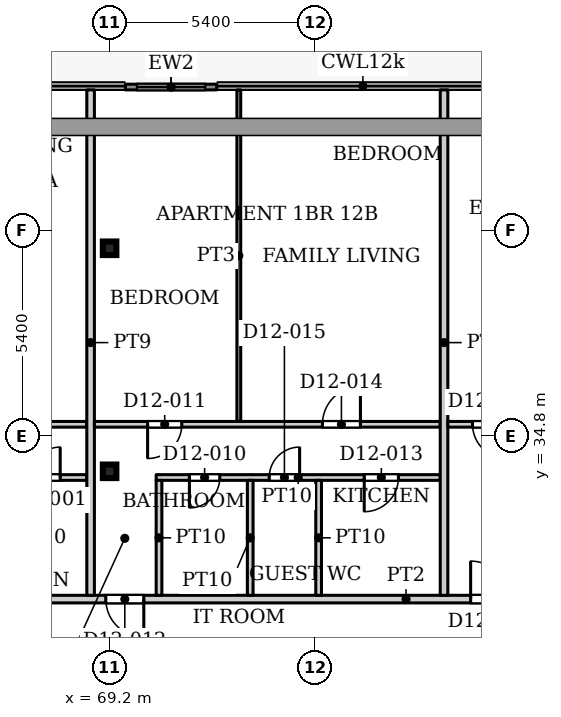
"""IFC4 building model, lengths in metres.
Left out: names, types, materials, properties, quantities, classifications, styles, units other than length and angle.
Written with IfcOpenShell. Run it as: python <this file> out.ifc"""

import sys

from ifc_helpers import new_model, si_unit, direction, frame, frame_2d, origin, origin_2d, place, context, subcontext, project, spatial, rectangle, hollow_rectangle, extrude, source, transform, mapped, element, fill, save


model = new_model("IFC4")
c1 = context("Model", 3, precision=1e-05, world=origin(), true_north=direction((0.0, 1.0)))
c2 = subcontext(c1, "Body", "Model", "MODEL_VIEW")
j1 = project(units=[si_unit("LENGTHUNIT", "METRE"), si_unit("PLANEANGLEUNIT", "RADIAN")], contexts=[c1])
p1 = place(None, origin())
s1 = spatial("IfcSite", under=j1, at=p1, CompositionType="ELEMENT")
p2 = place(p1, origin())
s2 = spatial("IfcBuilding", under=s1, at=p2, CompositionType="ELEMENT")
p3 = place(p2, frame((0.0, 0.0, 53.9)))
s3 = spatial("IfcBuildingStorey", under=s2, at=p3, CompositionType="ELEMENT", Elevation=53.9)
for number, where, z_axis, x_axis in (
    (1, (69.2, 33.863, 0.0), (0.0, 0.0, 1.0), (1.0, 0.0, 0.0)),
    (2, (69.2, 39.732, 0.0), (0.0, 0.0, 1.0), (1.0, 0.0, 0.0)),
):
    element("IfcColumn", number, at=place(p3, frame(where, z_axis=z_axis, x_axis=x_axis)), inside=s3, PredefinedType="COLUMN", context=c2, shape_type="SweptSolid", body=[
        extrude(hollow_rectangle(XDim=0.356, YDim=0.356, WallThickness=0.016, InnerFilletRadius=0.016, OuterFilletRadius=0.032, at=origin_2d()), origin(), (0.0, 0.0, 1.0), 3.9),
    ])
p4 = place(p3, frame((69.618, 43.975, 0.0), z_axis=(0.0, 0.0, 1.0), x_axis=(1.0, 0.0, 0.0)))
e3 = element("IfcWall", 3, at=p4, inside=s3, PredefinedType="SOLIDWALL", context=c2, shape_type="SweptSolid", body=[
    extrude(rectangle(XDim=2.4, YDim=0.15, at=frame_2d((1.2, 0.0))), origin(), (0.0, 0.0, 1.0), 3.75),
])
p5 = place(p4, frame((0.3, 0.0, 0.0)))
e4 = element("IfcOpeningElement", 4, at=p5, cuts=e3, PredefinedType="OPENING", context=c2, shape_type="SweptSolid", body=[
    extrude(rectangle(XDim=1.8, YDim=2.4, at=frame_2d((0.9, 1.2))), frame((0.0, 0.085, 0.0), z_axis=(0.0, -1.0, 0.0), x_axis=(1.0, 0.0, 0.0)), (0.0, 0.0, 1.0), 0.17),
])
p6 = place(p3, frame((55.9, 30.5, 0.0), z_axis=(0.0, 0.0, 1.0), x_axis=(1.0, 0.0, 0.0)))
e5 = element("IfcWall", 5, at=p6, inside=s3, PredefinedType="PARTITIONING", context=c2, shape_type="SweptSolid", body=[
    extrude(rectangle(XDim=42.2, YDim=0.2, at=frame_2d((21.1, 0.0))), origin(), (0.0, 0.0, 1.0), 3.6),
])
p7 = place(p6, frame((0.6, 0.0, 0.0)))
e6 = element("IfcOpeningElement", 6, at=p7, cuts=e5, PredefinedType="OPENING", context=c2, shape_type="SweptSolid", body=[
    extrude(rectangle(XDim=1.0, YDim=2.1, at=frame_2d((0.5, 1.05))), frame((0.0, 0.11, 0.0), z_axis=(0.0, -1.0, 0.0), x_axis=(1.0, 0.0, 0.0)), (0.0, 0.0, 1.0), 0.22),
])
p8 = place(p6, frame((13.2, 0.0, 0.0)))
e7 = element("IfcOpeningElement", 7, at=p8, cuts=e5, PredefinedType="OPENING", context=c2, shape_type="SweptSolid", body=[
    extrude(rectangle(XDim=1.0, YDim=2.1, at=frame_2d((0.5, 1.05))), frame((0.0, 0.11, 0.0), z_axis=(0.0, -1.0, 0.0), x_axis=(1.0, 0.0, 0.0)), (0.0, 0.0, 1.0), 0.22),
])
p9 = place(p6, frame((22.8, 0.0, 0.0)))
e8 = element("IfcOpeningElement", 8, at=p9, cuts=e5, PredefinedType="OPENING", context=c2, shape_type="SweptSolid", body=[
    extrude(rectangle(XDim=1.0, YDim=2.1, at=frame_2d((0.5, 1.05))), frame((0.0, 0.11, 0.0), z_axis=(0.0, -1.0, 0.0), x_axis=(1.0, 0.0, 0.0)), (0.0, 0.0, 1.0), 0.22),
])
p10 = place(p6, frame((34.65, 0.0, 0.0)))
e9 = element("IfcOpeningElement", 9, at=p10, cuts=e5, PredefinedType="OPENING", context=c2, shape_type="SweptSolid", body=[
    extrude(rectangle(XDim=1.0, YDim=2.1, at=frame_2d((0.5, 1.05))), frame((0.0, 0.11, 0.0), z_axis=(0.0, -1.0, 0.0), x_axis=(1.0, 0.0, 0.0)), (0.0, 0.0, 1.0), 0.22),
])
p11 = place(p3, frame((55.9, 35.1, 0.0), z_axis=(0.0, 0.0, 1.0), x_axis=(1.0, 0.0, 0.0)))
e10 = element("IfcWall", 10, at=p11, inside=s3, PredefinedType="PARTITIONING", context=c2, shape_type="SweptSolid", body=[
    extrude(rectangle(XDim=12.7, YDim=0.15, at=frame_2d((6.35, 0.0))), origin(), (0.0, 0.0, 1.0), 3.6),
])
p12 = place(p11, frame((1.25, 0.0, 0.0)))
e11 = element("IfcOpeningElement", 11, at=p12, cuts=e10, PredefinedType="OPENING", context=c2, shape_type="SweptSolid", body=[
    extrude(rectangle(XDim=0.9, YDim=2.1, at=frame_2d((0.45, 1.05))), frame((0.0, 0.085, 0.0), z_axis=(0.0, -1.0, 0.0), x_axis=(1.0, 0.0, 0.0)), (0.0, 0.0, 1.0), 0.17),
])
p13 = place(p11, frame((9.75, 0.0, 0.0)))
e12 = element("IfcOpeningElement", 12, at=p13, cuts=e10, PredefinedType="OPENING", context=c2, shape_type="SweptSolid", body=[
    extrude(rectangle(XDim=1.0, YDim=2.1, at=frame_2d((0.5, 1.05))), frame((0.0, 0.085, 0.0), z_axis=(0.0, -1.0, 0.0), x_axis=(1.0, 0.0, 0.0)), (0.0, 0.0, 1.0), 0.17),
])
p14 = place(p11, frame((4.1, 0.0, 0.0)))
e13 = element("IfcOpeningElement", 13, at=p14, cuts=e10, PredefinedType="OPENING", context=c2, shape_type="SweptSolid", body=[
    extrude(rectangle(XDim=0.9, YDim=2.1, at=frame_2d((0.45, 1.05))), frame((0.0, 0.085, 0.0), z_axis=(0.0, -1.0, 0.0), x_axis=(1.0, 0.0, 0.0)), (0.0, 0.0, 1.0), 0.17),
])
p15 = place(p3, frame((58.15, 33.7, 0.0), z_axis=(0.0, 0.0, 1.0), x_axis=(1.0, 0.0, 0.0)))
e14 = element("IfcWall", 14, at=p15, inside=s3, PredefinedType="PARTITIONING", context=c2, shape_type="SweptSolid", body=[
    extrude(rectangle(XDim=10.45, YDim=0.15, at=frame_2d((5.225, 0.0))), origin(), (0.0, 0.0, 1.0), 3.6),
])
p16 = place(p15, frame((8.95, 0.0, 0.0)))
e15 = element("IfcOpeningElement", 15, at=p16, cuts=e14, PredefinedType="OPENING", context=c2, shape_type="SweptSolid", body=[
    extrude(rectangle(XDim=0.8, YDim=2.1, at=frame_2d((0.4, 1.05))), frame((0.0, 0.085, 0.0), z_axis=(0.0, -1.0, 0.0), x_axis=(1.0, 0.0, 0.0)), (0.0, 0.0, 1.0), 0.17),
])
p17 = place(p15, frame((6.55, 0.0, 0.0)))
e16 = element("IfcOpeningElement", 16, at=p17, cuts=e14, PredefinedType="OPENING", context=c2, shape_type="SweptSolid", body=[
    extrude(rectangle(XDim=0.8, YDim=2.1, at=frame_2d((0.4, 1.05))), frame((0.0, 0.085, 0.0), z_axis=(0.0, -1.0, 0.0), x_axis=(1.0, 0.0, 0.0)), (0.0, 0.0, 1.0), 0.17),
])
p18 = place(p15, frame((1.55, 0.0, 0.0)))
e17 = element("IfcOpeningElement", 17, at=p18, cuts=e14, PredefinedType="OPENING", context=c2, shape_type="SweptSolid", body=[
    extrude(rectangle(XDim=0.9, YDim=2.1, at=frame_2d((0.45, 1.05))), frame((0.0, 0.085, 0.0), z_axis=(0.0, -1.0, 0.0), x_axis=(1.0, 0.0, 0.0)), (0.0, 0.0, 1.0), 0.17),
])
p19 = place(p15, frame((4.45, 0.0, 0.0)))
e18 = element("IfcOpeningElement", 18, at=p19, cuts=e14, PredefinedType="OPENING", context=c2, shape_type="SweptSolid", body=[
    extrude(rectangle(XDim=0.8, YDim=2.1, at=frame_2d((0.4, 1.05))), frame((0.0, 0.085, 0.0), z_axis=(0.0, -1.0, 0.0), x_axis=(1.0, 0.0, 0.0)), (0.0, 0.0, 1.0), 0.17),
])
p20 = place(p3, frame((68.7, 30.6, 0.0), z_axis=(0.0, 0.0, 1.0), x_axis=(0.0, 1.0, 0.0)))
e19 = element("IfcWall", 19, at=p20, inside=s3, PredefinedType="PARTITIONING", context=c2, shape_type="SweptSolid", body=[
    extrude(rectangle(XDim=13.3, YDim=0.2, at=frame_2d((6.65, 0.0))), origin(), (0.0, 0.0, 1.0), 3.6),
])
p21 = place(p3, frame((68.8, 35.1, 0.0), z_axis=(0.0, 0.0, 1.0), x_axis=(1.0, 0.0, 0.0)))
e20 = element("IfcWall", 20, at=p21, inside=s3, PredefinedType="PARTITIONING", context=c2, shape_type="SweptSolid", body=[
    extrude(rectangle(XDim=9.1, YDim=0.15, at=frame_2d((4.55, 0.0))), origin(), (0.0, 0.0, 1.0), 3.6),
])
p22 = place(p21, frame((1.4, 0.0, 0.0)))
e21 = element("IfcOpeningElement", 21, at=p22, cuts=e20, PredefinedType="OPENING", context=c2, shape_type="SweptSolid", body=[
    extrude(rectangle(XDim=0.9, YDim=2.1, at=frame_2d((0.45, 1.05))), frame((0.0, 0.085, 0.0), z_axis=(0.0, -1.0, 0.0), x_axis=(1.0, 0.0, 0.0)), (0.0, 0.0, 1.0), 0.17),
])
p23 = place(p21, frame((6.0, 0.0, 0.0)))
e22 = element("IfcOpeningElement", 22, at=p23, cuts=e20, PredefinedType="OPENING", context=c2, shape_type="SweptSolid", body=[
    extrude(rectangle(XDim=1.0, YDim=2.1, at=frame_2d((0.5, 1.05))), frame((0.0, 0.085, 0.0), z_axis=(0.0, -1.0, 0.0), x_axis=(1.0, 0.0, 0.0)), (0.0, 0.0, 1.0), 0.17),
])
p24 = place(p3, frame((70.425, 33.7, 0.0), z_axis=(0.0, 0.0, 1.0), x_axis=(1.0, 0.0, 0.0)))
e23 = element("IfcWall", 23, at=p24, inside=s3, PredefinedType="PARTITIONING", context=c2, shape_type="SweptSolid", body=[
    extrude(rectangle(XDim=7.475, YDim=0.15, at=frame_2d((3.737, 0.0))), origin(), (0.0, 0.0, 1.0), 3.6),
])
p25 = place(p24, frame((0.875, 0.0, 0.0)))
e24 = element("IfcOpeningElement", 24, at=p25, cuts=e23, PredefinedType="OPENING", context=c2, shape_type="SweptSolid", body=[
    extrude(rectangle(XDim=0.8, YDim=2.1, at=frame_2d((0.4, 1.05))), frame((0.0, 0.085, 0.0), z_axis=(0.0, -1.0, 0.0), x_axis=(1.0, 0.0, 0.0)), (0.0, 0.0, 1.0), 0.17),
])
p26 = place(p24, frame((5.475, 0.0, 0.0)))
e25 = element("IfcOpeningElement", 25, at=p26, cuts=e23, PredefinedType="OPENING", context=c2, shape_type="SweptSolid", body=[
    extrude(rectangle(XDim=0.9, YDim=2.1, at=frame_2d((0.45, 1.05))), frame((0.0, 0.085, 0.0), z_axis=(0.0, -1.0, 0.0), x_axis=(1.0, 0.0, 0.0)), (0.0, 0.0, 1.0), 0.17),
])
p27 = place(p24, frame((2.975, 0.0, 0.0)))
e26 = element("IfcOpeningElement", 26, at=p27, cuts=e23, PredefinedType="OPENING", context=c2, shape_type="SweptSolid", body=[
    extrude(rectangle(XDim=0.8, YDim=2.1, at=frame_2d((0.4, 1.05))), frame((0.0, 0.085, 0.0), z_axis=(0.0, -1.0, 0.0), x_axis=(1.0, 0.0, 0.0)), (0.0, 0.0, 1.0), 0.17),
])
p28 = place(p3, frame((70.5, 30.6, 0.0), z_axis=(0.0, 0.0, 1.0), x_axis=(0.0, 1.0, 0.0)))
e27 = element("IfcWall", 27, at=p28, inside=s3, PredefinedType="PARTITIONING", context=c2, shape_type="SweptSolid", body=[
    extrude(rectangle(XDim=3.025, YDim=0.15, at=frame_2d((1.512, 0.0))), origin(), (0.0, 0.0, 1.0), 3.6),
])
p29 = place(p3, frame((72.6, 35.175, 0.0), z_axis=(0.0, 0.0, 1.0), x_axis=(0.0, 1.0, 0.0)))
e28 = element("IfcWall", 28, at=p29, inside=s3, PredefinedType="PARTITIONING", context=c2, shape_type="SweptSolid", body=[
    extrude(rectangle(XDim=8.725, YDim=0.1, at=frame_2d((4.362, 0.0))), origin(), (0.0, 0.0, 1.0), 3.6),
])
for number, where, z_axis, x_axis in (
    (29, (72.9, 30.6, 0.0), (0.0, 0.0, 1.0), (0.0, 1.0, 0.0)),
    (30, (74.7, 30.6, 0.0), (0.0, 0.0, 1.0), (0.0, 1.0, 0.0)),
):
    element("IfcWall", number, at=place(p3, frame(where, z_axis=z_axis, x_axis=x_axis)), inside=s3, PredefinedType="PARTITIONING", context=c2, shape_type="SweptSolid", body=[
        extrude(rectangle(XDim=3.025, YDim=0.15, at=frame_2d((1.512, 0.0))), origin(), (0.0, 0.0, 1.0), 3.6),
    ])
p30 = place(p3, frame((78.0, 30.6, 0.0), z_axis=(0.0, 0.0, 1.0), x_axis=(0.0, 1.0, 0.0)))
e31 = element("IfcWall", 31, at=p30, inside=s3, PredefinedType="PARTITIONING", context=c2, shape_type="SweptSolid", body=[
    extrude(rectangle(XDim=13.3, YDim=0.2, at=frame_2d((6.65, 0.0))), origin(), (0.0, 0.0, 1.0), 3.6),
])
p31 = place(p3, frame((78.1, 35.1, 0.0), z_axis=(0.0, 0.0, 1.0), x_axis=(1.0, 0.0, 0.0)))
e32 = element("IfcWall", 32, at=p31, inside=s3, PredefinedType="PARTITIONING", context=c2, shape_type="SweptSolid", body=[
    extrude(rectangle(XDim=11.8, YDim=0.15, at=frame_2d((5.9, 0.0))), origin(), (0.0, 0.0, 1.0), 3.6),
])
p32 = place(p31, frame((0.65, 0.0, 0.0)))
e33 = element("IfcOpeningElement", 33, at=p32, cuts=e32, PredefinedType="OPENING", context=c2, shape_type="SweptSolid", body=[
    extrude(rectangle(XDim=0.9, YDim=2.1, at=frame_2d((0.45, 1.05))), frame((0.0, 0.085, 0.0), z_axis=(0.0, -1.0, 0.0), x_axis=(1.0, 0.0, 0.0)), (0.0, 0.0, 1.0), 0.17),
])
p33 = place(p31, frame((8.85, 0.0, 0.0)))
e34 = element("IfcOpeningElement", 34, at=p33, cuts=e32, PredefinedType="OPENING", context=c2, shape_type="SweptSolid", body=[
    extrude(rectangle(XDim=1.0, YDim=2.1, at=frame_2d((0.5, 1.05))), frame((0.0, 0.085, 0.0), z_axis=(0.0, -1.0, 0.0), x_axis=(1.0, 0.0, 0.0)), (0.0, 0.0, 1.0), 0.17),
])
p34 = place(p31, frame((5.15, 0.0, 0.0)))
e35 = element("IfcOpeningElement", 35, at=p34, cuts=e32, PredefinedType="OPENING", context=c2, shape_type="SweptSolid", body=[
    extrude(rectangle(XDim=0.9, YDim=2.1, at=frame_2d((0.45, 1.05))), frame((0.0, 0.085, 0.0), z_axis=(0.0, -1.0, 0.0), x_axis=(1.0, 0.0, 0.0)), (0.0, 0.0, 1.0), 0.17),
])
m1 = source(origin(), c2, "Body", "SweptSolid", [
    extrude(rectangle(XDim=1.8, YDim=2.4, at=frame_2d((0.9, 1.2))), frame((0.0, 0.025, 0.0), z_axis=(0.0, -1.0, 0.0), x_axis=(1.0, 0.0, 0.0)), (0.0, 0.0, 1.0), 0.05),
])
p35 = place(p5, origin())
e36 = element("IfcDoor", 36, at=p35, inside=s3, OperationType="SLIDING_TO_LEFT", PredefinedType="DOOR", context=c2, shape_type="MappedRepresentation", body=[
    mapped(m1, transform((0.0, 0.0, 0.0), x_axis=(1.0, 0.0, 0.0), y_axis=(0.0, 1.0, 0.0), z_axis=(0.0, 0.0, 1.0), scale=1.0)),
])
fill(e4, e36)
m2 = source(origin(), c2, "Body", "SweptSolid", [
    extrude(rectangle(XDim=0.8, YDim=2.1, at=frame_2d((0.4, 1.05))), frame((0.0, 0.025, 0.0), z_axis=(0.0, -1.0, 0.0), x_axis=(1.0, 0.0, 0.0)), (0.0, 0.0, 1.0), 0.05),
])
p36 = place(p16, origin())
e37 = element("IfcDoor", 37, at=p36, inside=s3, OperationType="SINGLE_SWING_LEFT", PredefinedType="DOOR", context=c2, shape_type="MappedRepresentation", body=[
    mapped(m2, transform((0.0, 0.0, 0.0), x_axis=(1.0, 0.0, 0.0), y_axis=(0.0, 1.0, 0.0), z_axis=(0.0, 0.0, 1.0), scale=1.0)),
])
fill(e15, e37)
p37 = place(p25, origin())
e38 = element("IfcDoor", 38, at=p37, inside=s3, OperationType="SINGLE_SWING_RIGHT", PredefinedType="DOOR", context=c2, shape_type="MappedRepresentation", body=[
    mapped(m2, transform((0.0, 0.0, 0.0), x_axis=(1.0, 0.0, 0.0), y_axis=(0.0, 1.0, 0.0), z_axis=(0.0, 0.0, 1.0), scale=1.0)),
])
fill(e24, e38)
m3 = source(origin(), c2, "Body", "SweptSolid", [
    extrude(rectangle(XDim=0.9, YDim=2.1, at=frame_2d((0.45, 1.05))), frame((0.0, 0.025, 0.0), z_axis=(0.0, -1.0, 0.0), x_axis=(1.0, 0.0, 0.0)), (0.0, 0.0, 1.0), 0.05),
])
p38 = place(p22, origin())
e39 = element("IfcDoor", 39, at=p38, inside=s3, OperationType="SINGLE_SWING_RIGHT", PredefinedType="DOOR", context=c2, shape_type="MappedRepresentation", body=[
    mapped(m3, transform((0.0, 0.0, 0.0), x_axis=(1.0, 0.0, 0.0), y_axis=(0.0, 1.0, 0.0), z_axis=(0.0, 0.0, 1.0), scale=1.0)),
])
fill(e21, e39)
m4 = source(origin(), c2, "Body", "SweptSolid", [
    extrude(rectangle(XDim=1.0, YDim=2.1, at=frame_2d((0.5, 1.05))), frame((0.0, 0.025, 0.0), z_axis=(0.0, -1.0, 0.0), x_axis=(1.0, 0.0, 0.0)), (0.0, 0.0, 1.0), 0.05),
])
p39 = place(p8, origin())
e40 = element("IfcDoor", 40, at=p39, inside=s3, OperationType="SINGLE_SWING_RIGHT", PredefinedType="DOOR", context=c2, shape_type="MappedRepresentation", body=[
    mapped(m4, transform((0.0, 0.0, 0.0), x_axis=(1.0, 0.0, 0.0), y_axis=(0.0, 1.0, 0.0), z_axis=(0.0, 0.0, 1.0), scale=1.0)),
])
fill(e7, e40)
p40 = place(p26, origin())
e41 = element("IfcDoor", 41, at=p40, inside=s3, OperationType="SINGLE_SWING_RIGHT", PredefinedType="DOOR", context=c2, shape_type="MappedRepresentation", body=[
    mapped(m3, transform((0.0, 0.0, 0.0), x_axis=(1.0, 0.0, 0.0), y_axis=(0.0, 1.0, 0.0), z_axis=(0.0, 0.0, 1.0), scale=1.0)),
])
fill(e25, e41)
m5 = source(origin(), c2, "Body", "SweptSolid", [
    extrude(rectangle(XDim=1.0, YDim=2.1, at=frame_2d((0.5, 1.05))), frame((0.0, 0.025, 0.0), z_axis=(0.0, -1.0, 0.0), x_axis=(1.0, 0.0, 0.0)), (0.0, 0.0, 1.0), 0.05),
])
p41 = place(p23, origin())
e42 = element("IfcDoor", 42, at=p41, inside=s3, OperationType="SINGLE_SWING_LEFT", PredefinedType="DOOR", context=c2, shape_type="MappedRepresentation", body=[
    mapped(m5, transform((0.0, 0.0, 0.0), x_axis=(1.0, 0.0, 0.0), y_axis=(0.0, 1.0, 0.0), z_axis=(0.0, 0.0, 1.0), scale=1.0)),
])
fill(e22, e42)
p42 = place(p27, origin())
e43 = element("IfcDoor", 43, at=p42, inside=s3, OperationType="SINGLE_SWING_LEFT", PredefinedType="DOOR", context=c2, shape_type="MappedRepresentation", body=[
    mapped(m2, transform((0.0, 0.0, 0.0), x_axis=(1.0, 0.0, 0.0), y_axis=(0.0, 1.0, 0.0), z_axis=(0.0, 0.0, 1.0), scale=1.0)),
])
fill(e26, e43)
p43 = place(p32, origin())
e44 = element("IfcDoor", 44, at=p43, inside=s3, OperationType="SINGLE_SWING_RIGHT", PredefinedType="DOOR", context=c2, shape_type="MappedRepresentation", body=[
    mapped(m3, transform((0.0, 0.0, 0.0), x_axis=(1.0, 0.0, 0.0), y_axis=(0.0, 1.0, 0.0), z_axis=(0.0, 0.0, 1.0), scale=1.0)),
])
fill(e33, e44)
p44 = place(p9, origin())
e45 = element("IfcDoor", 45, at=p44, inside=s3, OperationType="SINGLE_SWING_LEFT", PredefinedType="DOOR", context=c2, shape_type="MappedRepresentation", body=[
    mapped(m4, transform((0.0, 0.0, 0.0), x_axis=(1.0, 0.0, 0.0), y_axis=(0.0, 1.0, 0.0), z_axis=(0.0, 0.0, 1.0), scale=1.0)),
])
fill(e8, e45)
save(model, sys.argv[1])
